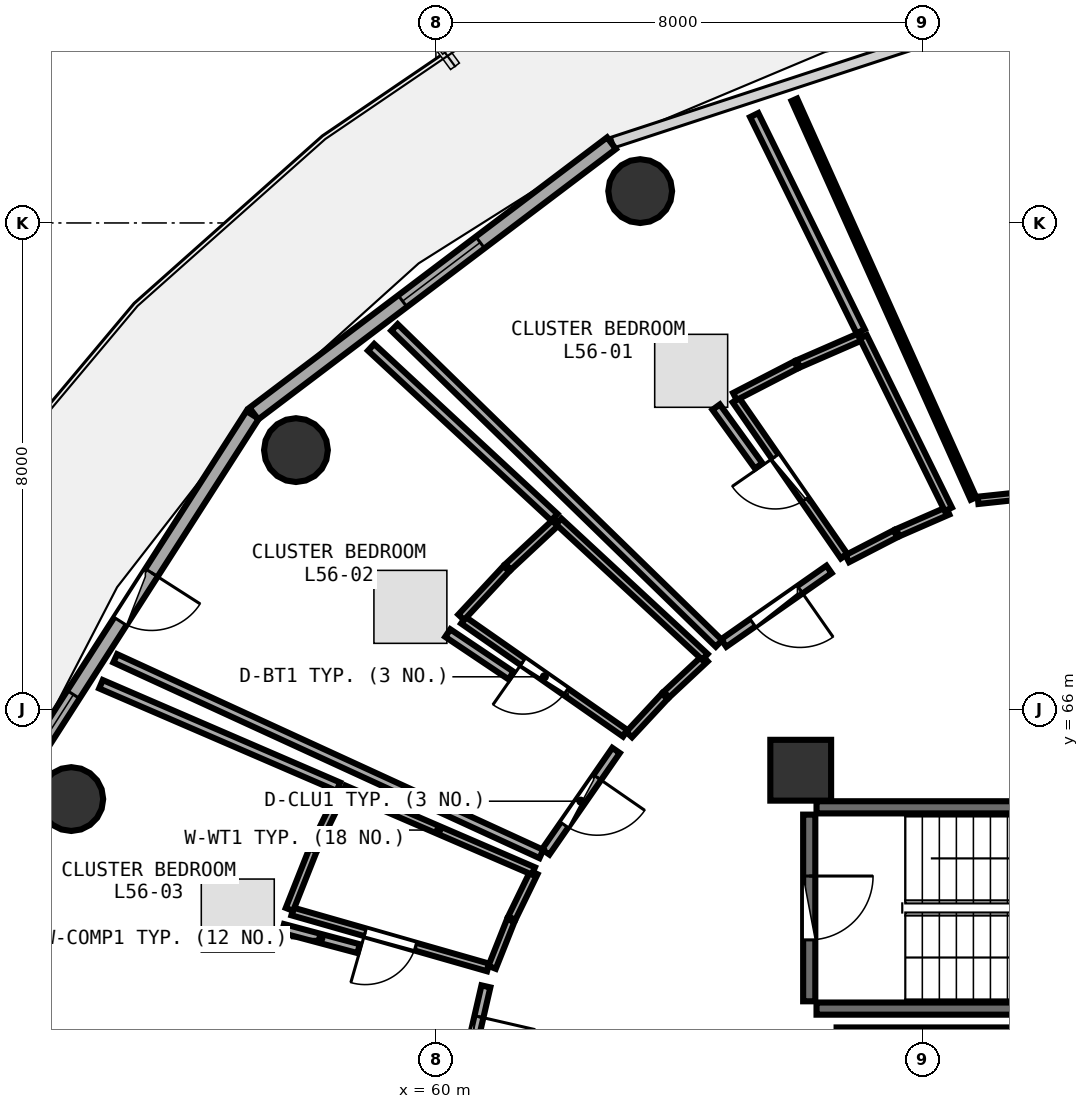
"""IFC4 building model, lengths in metres.
Left out: names, types, materials, properties, quantities, classifications, styles, units other than length and angle.
Written with IfcOpenShell. Run it as: python <this file> out.ifc"""

import sys

from ifc_helpers import new_model, si_unit, direction, frame, frame_2d, origin, origin_2d, place, context, subcontext, project, spatial, rectangle, circle, extrude, element, fill, save


model = new_model("IFC4")
c1 = context("Model", 3, precision=1e-05, world=origin(), true_north=direction((0.0, 1.0)))
c2 = subcontext(c1, "Body", "Model", "MODEL_VIEW")
j1 = project(units=[si_unit("LENGTHUNIT", "METRE"), si_unit("PLANEANGLEUNIT", "RADIAN")], contexts=[c1])
p1 = place(None, origin())
s1 = spatial("IfcSite", under=j1, at=p1, CompositionType="ELEMENT")
p2 = place(p1, origin())
s2 = spatial("IfcBuilding", under=s1, at=p2, CompositionType="ELEMENT")
p3 = place(p2, frame((0.0, 0.0, 219.45)))
s3 = spatial("IfcBuildingStorey", under=s2, at=p3, CompositionType="ELEMENT", Elevation=219.45)
p4 = place(p3, frame((66.0, 65.0, 0.0), z_axis=(0.0, 0.0, 1.0), x_axis=(1.0, 0.0, 0.0)))
e1 = element("IfcColumn", 1, at=p4, inside=s3, PredefinedType="PILASTER", context=c2, shape_type="SweptSolid", body=[
    extrude(rectangle(XDim=1.0, YDim=1.0, at=origin_2d()), origin(), (0.0, 0.0, 1.0), 3.75),
])
for number, where, z_axis, x_axis in (
    (2, (63.36, 74.524, 0.0), (0.0, 0.0, 1.0), (1.0, 0.0, 0.0)),
    (3, (57.698, 70.264, 0.0), (0.0, 0.0, 1.0), (1.0, 0.0, 0.0)),
    (4, (54.003, 64.526, 0.0), (0.0, 0.0, 1.0), (1.0, 0.0, 0.0)),
):
    element("IfcColumn", number, at=place(p3, frame(where, z_axis=z_axis, x_axis=x_axis)), inside=s3, PredefinedType="COLUMN", context=c2, shape_type="SweptSolid", body=[
        extrude(circle(Radius=0.525, at=origin_2d()), origin(), (0.0, 0.0, 1.0), 3.75),
    ])
p5 = place(p3, frame((62.888, 75.312, 0.0), z_axis=(0.0, 0.0, 1.0), x_axis=(-0.797701674595, -0.603052268338, 0.0)))
e5 = element("IfcWall", 5, at=p5, inside=s3, PredefinedType="SOLIDWALL", context=c2, shape_type="SweptSolid", body=[
    extrude(rectangle(XDim=7.374, YDim=0.24, at=frame_2d((3.687, 0.0))), origin(), (0.0, 0.0, 1.0), 3.475),
])
p6 = place(p5, frame((2.707, 0.0, 0.85)))
e6 = element("IfcOpeningElement", 6, at=p6, cuts=e5, PredefinedType="OPENING", context=c2, shape_type="SweptSolid", body=[
    extrude(rectangle(XDim=1.6, YDim=1.45, at=frame_2d((0.8, 0.725))), frame((0.0, 0.13, 0.0), z_axis=(0.0, -1.0, 0.0), x_axis=(1.0, 0.0, 0.0)), (0.0, 0.0, 1.0), 0.26),
])
p7 = place(p3, frame((56.986, 70.843, 0.0), z_axis=(0.0, 0.0, 1.0), x_axis=(-0.539539512973, -0.841960280501, 0.0)))
e7 = element("IfcWall", 7, at=p7, inside=s3, PredefinedType="SOLIDWALL", context=c2, shape_type="SweptSolid", body=[
    extrude(rectangle(XDim=7.115, YDim=0.24, at=frame_2d((3.557, 0.0))), origin(), (0.0, 0.0, 1.0), 3.475),
])
p8 = place(p7, frame((3.082, 0.0, 0.0)))
e8 = element("IfcOpeningElement", 8, at=p8, cuts=e7, PredefinedType="OPENING", context=c2, shape_type="SweptSolid", body=[
    extrude(rectangle(XDim=0.95, YDim=2.1, at=frame_2d((0.475, 1.05))), frame((0.0, 0.13, 0.0), z_axis=(0.0, -1.0, 0.0), x_axis=(1.0, 0.0, 0.0)), (0.0, 0.0, 1.0), 0.26),
])
p9 = place(p7, frame((5.462, 0.0, 0.85)))
e9 = element("IfcOpeningElement", 9, at=p9, cuts=e7, PredefinedType="OPENING", context=c2, shape_type="SweptSolid", body=[
    extrude(rectangle(XDim=1.2, YDim=1.45, at=frame_2d((0.6, 0.725))), frame((0.0, 0.13, 0.0), z_axis=(0.0, -1.0, 0.0), x_axis=(1.0, 0.0, 0.0)), (0.0, 0.0, 1.0), 0.26),
])
for number, where, z_axis, x_axis in (
    (10, (66.26, 61.08, 0.0), (0.0, 0.0, 1.0), (1.0, 0.0, 0.0)),
    (11, (73.42, 64.39, 0.0), (0.0, 0.0, 1.0), (-1.0, 0.0, 0.0)),
):
    element("IfcWall", number, at=place(p3, frame(where, z_axis=z_axis, x_axis=x_axis)), inside=s3, PredefinedType="SHEAR", context=c2, shape_type="SweptSolid", body=[
        extrude(rectangle(XDim=7.16, YDim=0.2, at=frame_2d((3.58, 0.0))), origin(), (0.0, 0.0, 1.0), 3.49),
    ])
p10 = place(p3, frame((66.14, 64.27, 0.0), z_axis=(0.0, 0.0, 1.0), x_axis=(0.0, -1.0, 0.0)))
e12 = element("IfcWall", 12, at=p10, inside=s3, PredefinedType="SHEAR", context=c2, shape_type="SweptSolid", body=[
    extrude(rectangle(XDim=3.07, YDim=0.2, at=frame_2d((1.535, 0.0))), origin(), (0.0, 0.0, 1.0), 3.49),
])
p11 = place(p10, frame((1.01, 0.0, 0.0)))
e13 = element("IfcOpeningElement", 13, at=p11, cuts=e12, PredefinedType="OPENING", context=c2, shape_type="SweptSolid", body=[
    extrude(rectangle(XDim=1.05, YDim=2.1, at=frame_2d((0.525, 1.05))), frame((0.0, 0.11, 0.0), z_axis=(0.0, -1.0, 0.0), x_axis=(1.0, 0.0, 0.0)), (0.0, 0.0, 1.0), 0.22),
])
p12 = place(p3, frame((75.969, 70.189, 0.0), z_axis=(0.0, 0.0, 1.0), x_axis=(-0.994385599796, -0.105817195755, 0.0)))
e14 = element("IfcWall", 14, at=p12, inside=s3, PredefinedType="PARTITIONING", context=c2, shape_type="SweptSolid", body=[
    extrude(rectangle(XDim=7.092, YDim=0.12, at=frame_2d((3.546, 0.0))), origin(), (0.0, 0.0, 1.0), 3.025),
])
p13 = place(p12, frame((3.096, 0.0, 0.0)))
e15 = element("IfcOpeningElement", 15, at=p13, cuts=e14, PredefinedType="OPENING", context=c2, shape_type="SweptSolid", body=[
    extrude(rectangle(XDim=0.9, YDim=2.08, at=frame_2d((0.45, 1.04))), frame((0.0, 0.07, 0.0), z_axis=(0.0, -1.0, 0.0), x_axis=(1.0, 0.0, 0.0)), (0.0, 0.0, 1.0), 0.14),
])
p14 = place(p3, frame((66.714, 68.519, 0.0), z_axis=(0.0, 0.0, 1.0), x_axis=(-0.569575575996, 0.821938965635, 0.0)))
e16 = element("IfcWall", 16, at=p14, inside=s3, PredefinedType="PLUMBINGWALL", context=c2, shape_type="SweptSolid", body=[
    extrude(rectangle(XDim=3.125, YDim=0.13, at=frame_2d((1.562, 0.0))), origin(), (0.0, 0.0, 1.0), 3.175),
])
p15 = place(p14, frame((1.132, 0.0, 0.0)))
e17 = element("IfcOpeningElement", 17, at=p15, cuts=e16, PredefinedType="OPENING", context=c2, shape_type="SweptSolid", body=[
    extrude(rectangle(XDim=0.86, YDim=2.05, at=frame_2d((0.43, 1.025))), frame((0.0, 0.075, 0.0), z_axis=(0.0, -1.0, 0.0), x_axis=(1.0, 0.0, 0.0)), (0.0, 0.0, 1.0), 0.15),
])
p16 = place(p3, frame((66.466, 68.302, 0.0), z_axis=(0.0, 0.0, 1.0), x_axis=(-0.819606107513, -0.572927419948, 0.0)))
e18 = element("IfcWall", 18, at=p16, inside=s3, PredefinedType="PARTITIONING", context=c2, shape_type="SweptSolid", body=[
    extrude(rectangle(XDim=2.114, YDim=0.15, at=frame_2d((1.057, 0.0))), origin(), (0.0, 0.0, 1.0), 3.025),
])
p17 = place(p16, frame((0.582, 0.0, 0.0)))
e19 = element("IfcOpeningElement", 19, at=p17, cuts=e18, PredefinedType="OPENING", context=c2, shape_type="SweptSolid", body=[
    extrude(rectangle(XDim=0.95, YDim=2.08, at=frame_2d((0.475, 1.04))), frame((0.0, 0.085, 0.0), z_axis=(0.0, -1.0, 0.0), x_axis=(1.0, 0.0, 0.0)), (0.0, 0.0, 1.0), 0.17),
])
p18 = place(p3, frame((63.115, 65.606, 0.0), z_axis=(0.0, 0.0, 1.0), x_axis=(-0.819768322712, 0.57269529165, 0.0)))
e20 = element("IfcWall", 20, at=p18, inside=s3, PredefinedType="PLUMBINGWALL", context=c2, shape_type="SweptSolid", body=[
    extrude(rectangle(XDim=3.248, YDim=0.13, at=frame_2d((1.624, 0.0))), origin(), (0.0, 0.0, 1.0), 3.175),
])
p19 = place(p18, frame((1.194, 0.0, 0.0)))
e21 = element("IfcOpeningElement", 21, at=p19, cuts=e20, PredefinedType="OPENING", context=c2, shape_type="SweptSolid", body=[
    extrude(rectangle(XDim=0.86, YDim=2.05, at=frame_2d((0.43, 1.025))), frame((0.0, 0.075, 0.0), z_axis=(0.0, -1.0, 0.0), x_axis=(1.0, 0.0, 0.0)), (0.0, 0.0, 1.0), 0.15),
])
p20 = place(p3, frame((62.963, 65.326, 0.0), z_axis=(0.0, 0.0, 1.0), x_axis=(-0.569634666298, -0.821898014933, 0.0)))
e22 = element("IfcWall", 22, at=p20, inside=s3, PredefinedType="PARTITIONING", context=c2, shape_type="SweptSolid", body=[
    extrude(rectangle(XDim=2.032, YDim=0.15, at=frame_2d((1.016, 0.0))), origin(), (0.0, 0.0, 1.0), 3.025),
])
p21 = place(p20, frame((0.541, 0.0, 0.0)))
e23 = element("IfcOpeningElement", 23, at=p21, cuts=e22, PredefinedType="OPENING", context=c2, shape_type="SweptSolid", body=[
    extrude(rectangle(XDim=0.95, YDim=2.08, at=frame_2d((0.475, 1.04))), frame((0.0, 0.085, 0.0), z_axis=(0.0, -1.0, 0.0), x_axis=(1.0, 0.0, 0.0)), (0.0, 0.0, 1.0), 0.17),
])
p22 = place(p3, frame((60.859, 61.757, 0.0), z_axis=(0.0, 0.0, 1.0), x_axis=(-0.961479890051, 0.274875282679, 0.0)))
e24 = element("IfcWall", 24, at=p22, inside=s3, PredefinedType="PLUMBINGWALL", context=c2, shape_type="SweptSolid", body=[
    extrude(rectangle(XDim=3.347, YDim=0.13, at=frame_2d((1.673, 0.0))), origin(), (0.0, 0.0, 1.0), 3.175),
])
p23 = place(p22, frame((1.243, 0.0, 0.0)))
e25 = element("IfcOpeningElement", 25, at=p23, cuts=e24, PredefinedType="OPENING", context=c2, shape_type="SweptSolid", body=[
    extrude(rectangle(XDim=0.86, YDim=2.05, at=frame_2d((0.43, 1.025))), frame((0.0, 0.075, 0.0), z_axis=(0.0, -1.0, 0.0), x_axis=(1.0, 0.0, 0.0)), (0.0, 0.0, 1.0), 0.15),
])
p24 = place(p3, frame((60.823, 61.446, 0.0), z_axis=(0.0, 0.0, 1.0), x_axis=(-0.223956243079, -0.97459920028, 0.0)))
e26 = element("IfcWall", 26, at=p24, inside=s3, PredefinedType="PARTITIONING", context=c2, shape_type="SweptSolid", body=[
    extrude(rectangle(XDim=1.974, YDim=0.15, at=frame_2d((0.987, 0.0))), origin(), (0.0, 0.0, 1.0), 3.48),
])
p25 = place(p24, frame((0.512, 0.0, 0.0)))
e27 = element("IfcOpeningElement", 27, at=p25, cuts=e26, PredefinedType="OPENING", context=c2, shape_type="SweptSolid", body=[
    extrude(rectangle(XDim=0.95, YDim=2.08, at=frame_2d((0.475, 1.04))), frame((0.0, 0.085, 0.0), z_axis=(0.0, -1.0, 0.0), x_axis=(1.0, 0.0, 0.0)), (0.0, 0.0, 1.0), 0.17),
])
p26 = place(p3, frame((72.41, 60.72, 0.0), z_axis=(0.0, 0.0, 1.0), x_axis=(-1.0, 0.0, 0.0)))
e28 = element("IfcWall", 28, at=p26, inside=s3, PredefinedType="PARTITIONING", context=c2, shape_type="SweptSolid", body=[
    extrude(rectangle(XDim=5.82, YDim=0.1, at=frame_2d((2.91, 0.0))), origin(), (0.0, 0.0, 1.0), 3.48),
])
p27 = place(p3, frame((68.841, 69.469, 0.0), z_axis=(0.0, 0.0, 1.0), x_axis=(-0.409724811959, 0.912209174732, 0.0)))
e29 = element("IfcWall", 29, at=p27, inside=s3, PredefinedType="PARTITIONING", context=c2, shape_type="SweptSolid", body=[
    extrude(rectangle(XDim=7.188, YDim=0.1, at=frame_2d((3.594, 0.0))), origin(), (0.0, 0.0, 1.0), 3.075),
])
p28 = place(p3, frame((68.419, 69.265, 0.0), z_axis=(0.0, 0.0, 1.0), x_axis=(-0.916724041683, -0.399521002453, 0.0)))
e30 = element("IfcWall", 30, at=p28, inside=s3, PredefinedType="PLUMBINGWALL", context=c2, shape_type="SweptSolid", body=[
    extrude(rectangle(XDim=0.898, YDim=0.13, at=frame_2d((0.449, 0.0))), origin(), (0.0, 0.0, 1.0), 3.235),
])
p29 = place(p3, frame((67.559, 68.889, 0.0), z_axis=(0.0, 0.0, 1.0), x_axis=(-0.888498384955, -0.458879744523, 0.0)))
e31 = element("IfcWall", 31, at=p29, inside=s3, PredefinedType="PLUMBINGWALL", context=c2, shape_type="SweptSolid", body=[
    extrude(rectangle(XDim=0.893, YDim=0.13, at=frame_2d((0.446, 0.0))), origin(), (0.0, 0.0, 1.0), 3.235),
])
p30 = place(p3, frame((64.918, 71.146, 0.0), z_axis=(0.0, 0.0, 1.0), x_axis=(0.88839364622, 0.459082486439, 0.0)))
e32 = element("IfcWall", 32, at=p30, inside=s3, PredefinedType="PLUMBINGWALL", context=c2, shape_type="SweptSolid", body=[
    extrude(rectangle(XDim=1.132, YDim=0.13, at=frame_2d((0.566, 0.0))), origin(), (0.0, 0.0, 1.0), 3.48),
])
p31 = place(p3, frame((65.959, 71.683, 0.0), z_axis=(0.0, 0.0, 1.0), x_axis=(0.916875363269, 0.399173606631, 0.0)))
e33 = element("IfcWall", 33, at=p31, inside=s3, PredefinedType="PLUMBINGWALL", context=c2, shape_type="SweptSolid", body=[
    extrude(rectangle(XDim=1.137, YDim=0.13, at=frame_2d((0.568, 0.0))), origin(), (0.0, 0.0, 1.0), 3.48),
])
p32 = place(p3, frame((67.029, 72.127, 0.0), z_axis=(0.0, 0.0, 1.0), x_axis=(0.442483009424, -0.896776887732, 0.0)))
e34 = element("IfcWall", 34, at=p32, inside=s3, PredefinedType="PLUMBINGWALL", context=c2, shape_type="SweptSolid", body=[
    extrude(rectangle(XDim=3.163, YDim=0.13, at=frame_2d((1.581, 0.0))), origin(), (0.0, 0.0, 1.0), 3.175),
])
p33 = place(p3, frame((64.655, 67.085, 0.0), z_axis=(0.0, 0.0, 1.0), x_axis=(-0.716418161924, 0.697671138335, 0.0)))
e35 = element("IfcWall", 35, at=p33, inside=s3, PredefinedType="PARTITIONING", context=c2, shape_type="SweptSolid", body=[
    extrude(rectangle(XDim=7.449, YDim=0.15, at=frame_2d((3.725, 0.0))), origin(), (0.0, 0.0, 1.0), 3.075),
])
p34 = place(p3, frame((65.235, 75.774, 0.0), z_axis=(0.0, 0.0, 1.0), x_axis=(0.441884590329, -0.897071908394, 0.0)))
e36 = element("IfcWall", 36, at=p34, inside=s3, PredefinedType="PARTITIONING", context=c2, shape_type="SweptSolid", body=[
    extrude(rectangle(XDim=3.964, YDim=0.15, at=frame_2d((1.982, 0.0))), origin(), (0.0, 0.0, 1.0), 3.075),
])
p35 = place(p3, frame((64.609, 70.972, 0.0), z_axis=(0.0, 0.0, 1.0), x_axis=(0.586088334164, -0.810247162634, 0.0)))
e37 = element("IfcWall", 37, at=p35, inside=s3, PredefinedType="PARTITIONING", context=c2, shape_type="SweptSolid", body=[
    extrude(rectangle(XDim=1.193, YDim=0.15, at=frame_2d((0.596, 0.0))), origin(), (0.0, 0.0, 1.0), 3.175),
])
p36 = place(p3, frame((64.425, 66.836, 0.0), z_axis=(0.0, 0.0, 1.0), x_axis=(-0.73090544696, -0.68247873784, 0.0)))
e38 = element("IfcWall", 38, at=p36, inside=s3, PredefinedType="PLUMBINGWALL", context=c2, shape_type="SweptSolid", body=[
    extrude(rectangle(XDim=0.867, YDim=0.13, at=frame_2d((0.434, 0.0))), origin(), (0.0, 0.0, 1.0), 3.025),
])
p37 = place(p3, frame((63.763, 66.216, 0.0), z_axis=(0.0, 0.0, 1.0), x_axis=(-0.681245485542, -0.732055044672, 0.0)))
e39 = element("IfcWall", 39, at=p37, inside=s3, PredefinedType="PLUMBINGWALL", context=c2, shape_type="SweptSolid", body=[
    extrude(rectangle(XDim=0.86, YDim=0.13, at=frame_2d((0.43, 0.0))), origin(), (0.0, 0.0, 1.0), 3.025),
])
p38 = place(p3, frame((60.417, 67.516, 0.0), z_axis=(0.0, 0.0, 1.0), x_axis=(0.68101744228, 0.732267193933, 0.0)))
e40 = element("IfcWall", 40, at=p38, inside=s3, PredefinedType="PLUMBINGWALL", context=c2, shape_type="SweptSolid", body=[
    extrude(rectangle(XDim=1.091, YDim=0.13, at=frame_2d((0.545, 0.0))), origin(), (0.0, 0.0, 1.0), 3.025),
])
p39 = place(p3, frame((61.188, 68.343, 0.0), z_axis=(0.0, 0.0, 1.0), x_axis=(0.731358373013, 0.681993350572, 0.0)))
e41 = element("IfcWall", 41, at=p39, inside=s3, PredefinedType="PLUMBINGWALL", context=c2, shape_type="SweptSolid", body=[
    extrude(rectangle(XDim=1.098, YDim=0.13, at=frame_2d((0.549, 0.0))), origin(), (0.0, 0.0, 1.0), 3.175),
])
p40 = place(p3, frame((62.02, 69.091, 0.0), z_axis=(0.0, 0.0, 1.0), x_axis=(0.733691925976, -0.679482271849, 0.0)))
e42 = element("IfcWall", 42, at=p40, inside=s3, PredefinedType="PLUMBINGWALL", context=c2, shape_type="SweptSolid", body=[
    extrude(rectangle(XDim=3.279, YDim=0.13, at=frame_2d((1.639, 0.0))), origin(), (0.0, 0.0, 1.0), 3.175),
])
p41 = place(p3, frame((61.735, 63.623, 0.0), z_axis=(0.0, 0.0, 1.0), x_axis=(-0.908799831152, 0.417232389561, 0.0)))
e43 = element("IfcWall", 43, at=p41, inside=s3, PredefinedType="PARTITIONING", context=c2, shape_type="SweptSolid", body=[
    extrude(rectangle(XDim=7.712, YDim=0.15, at=frame_2d((3.856, 0.0))), origin(), (0.0, 0.0, 1.0), 3.025),
])
p42 = place(p3, frame((58.934, 71.955, 0.0), z_axis=(0.0, 0.0, 1.0), x_axis=(0.733337091809, -0.679865214419, 0.0)))
e44 = element("IfcWall", 44, at=p42, inside=s3, PredefinedType="PARTITIONING", context=c2, shape_type="SweptSolid", body=[
    extrude(rectangle(XDim=4.109, YDim=0.15, at=frame_2d((2.055, 0.0))), origin(), (0.0, 0.0, 1.0), 3.075),
])
p43 = place(p3, frame((60.195, 67.256, 0.0), z_axis=(0.0, 0.0, 1.0), x_axis=(0.830279043522, -0.557347925347, 0.0)))
e45 = element("IfcWall", 45, at=p43, inside=s3, PredefinedType="PARTITIONING", context=c2, shape_type="SweptSolid", body=[
    extrude(rectangle(XDim=1.254, YDim=0.15, at=frame_2d((0.627, 0.0))), origin(), (0.0, 0.0, 1.0), 3.175),
])
p44 = place(p3, frame((61.613, 63.318, 0.0), z_axis=(0.0, 0.0, 1.0), x_axis=(-0.437484879269, -0.899225767208, 0.0)))
e46 = element("IfcWall", 46, at=p44, inside=s3, PredefinedType="PLUMBINGWALL", context=c2, shape_type="SweptSolid", body=[
    extrude(rectangle(XDim=0.835, YDim=0.13, at=frame_2d((0.418, 0.0))), origin(), (0.0, 0.0, 1.0), 3.235),
])
p45 = place(p3, frame((61.232, 62.531, 0.0), z_axis=(0.0, 0.0, 1.0), x_axis=(-0.369921104598, -0.929063171358, 0.0)))
e47 = element("IfcWall", 47, at=p45, inside=s3, PredefinedType="PLUMBINGWALL", context=c2, shape_type="SweptSolid", body=[
    extrude(rectangle(XDim=0.831, YDim=0.13, at=frame_2d((0.416, 0.0))), origin(), (0.0, 0.0, 1.0), 3.235),
])
p46 = place(p3, frame((57.591, 62.712, 0.0), z_axis=(0.0, 0.0, 1.0), x_axis=(0.368988727478, 0.929433870157, 0.0)))
e48 = element("IfcWall", 48, at=p46, inside=s3, PredefinedType="PLUMBINGWALL", context=c2, shape_type="SweptSolid", body=[
    extrude(rectangle(XDim=1.052, YDim=0.13, at=frame_2d((0.526, 0.0))), origin(), (0.0, 0.0, 1.0), 3.48),
])
p47 = place(p3, frame((57.996, 63.726, 0.0), z_axis=(0.0, 0.0, 1.0), x_axis=(0.438432715101, 0.898764014816, 0.0)))
e49 = element("IfcWall", 49, at=p47, inside=s3, PredefinedType="PLUMBINGWALL", context=c2, shape_type="SweptSolid", body=[
    extrude(rectangle(XDim=1.059, YDim=0.13, at=frame_2d((0.53, 0.0))), origin(), (0.0, 0.0, 1.0), 3.025),
])
p48 = place(p3, frame((58.487, 64.688, 0.0), z_axis=(0.0, 0.0, 1.0), x_axis=(0.918238400885, -0.396028078727, 0.0)))
e50 = element("IfcWall", 50, at=p48, inside=s3, PredefinedType="PLUMBINGWALL", context=c2, shape_type="SweptSolid", body=[
    extrude(rectangle(XDim=3.394, YDim=0.13, at=frame_2d((1.697, 0.0))), origin(), (0.0, 0.0, 1.0), 3.025),
])
p49 = place(p3, frame((54.492, 66.414, 0.0), z_axis=(0.0, 0.0, 1.0), x_axis=(0.918147334224, -0.396239160934, 0.0)))
e51 = element("IfcWall", 51, at=p49, inside=s3, PredefinedType="PARTITIONING", context=c2, shape_type="SweptSolid", body=[
    extrude(rectangle(XDim=4.253, YDim=0.15, at=frame_2d((2.126, 0.0))), origin(), (0.0, 0.0, 1.0), 3.025),
])
p50 = place(p3, frame((57.483, 62.398, 0.0), z_axis=(0.0, 0.0, 1.0), x_axis=(0.966263202112, -0.257556642788, 0.0)))
e52 = element("IfcWall", 52, at=p50, inside=s3, PredefinedType="PARTITIONING", context=c2, shape_type="SweptSolid", body=[
    extrude(rectangle(XDim=1.29, YDim=0.15, at=frame_2d((0.645, 0.0))), origin(), (0.0, 0.0, 1.0), 3.175),
])
p51 = place(p6, origin())
e53 = element("IfcWindow", 53, at=p51, inside=s3, PartitioningType="SINGLE_PANEL", PredefinedType="WINDOW", context=c2, shape_type="SweptSolid", body=[
    extrude(rectangle(XDim=1.6, YDim=1.45, at=frame_2d((0.8, 0.725))), frame((0.0, 0.03, 0.0), z_axis=(0.0, -1.0, 0.0), x_axis=(1.0, 0.0, 0.0)), (0.0, 0.0, 1.0), 0.06),
])
fill(e6, e53)
p52 = place(p8, frame((0.95, 0.0, 0.0), z_axis=(0.0, 0.0, 1.0), x_axis=(-1.0, 0.0, 0.0)))
e54 = element("IfcDoor", 54, at=p52, inside=s3, OperationType="SINGLE_SWING_RIGHT", PredefinedType="DOOR", context=c2, shape_type="SweptSolid", body=[
    extrude(rectangle(XDim=0.95, YDim=2.1, at=frame_2d((0.475, 1.05))), frame((0.0, 0.025, 0.0), z_axis=(0.0, -1.0, 0.0), x_axis=(1.0, 0.0, 0.0)), (0.0, 0.0, 1.0), 0.05),
])
fill(e8, e54)
p53 = place(p9, origin())
e55 = element("IfcWindow", 55, at=p53, inside=s3, PartitioningType="SINGLE_PANEL", PredefinedType="WINDOW", context=c2, shape_type="SweptSolid", body=[
    extrude(rectangle(XDim=1.2, YDim=1.45, at=frame_2d((0.6, 0.725))), frame((0.0, 0.03, 0.0), z_axis=(0.0, -1.0, 0.0), x_axis=(1.0, 0.0, 0.0)), (0.0, 0.0, 1.0), 0.06),
])
fill(e9, e55)
p54 = place(p11, origin())
e56 = element("IfcDoor", 56, at=p54, inside=s3, OperationType="SINGLE_SWING_LEFT", PredefinedType="DOOR", context=c2, shape_type="SweptSolid", body=[
    extrude(rectangle(XDim=1.05, YDim=2.1, at=frame_2d((0.525, 1.05))), frame((0.0, 0.025, 0.0), z_axis=(0.0, -1.0, 0.0), x_axis=(1.0, 0.0, 0.0)), (0.0, 0.0, 1.0), 0.05),
])
fill(e13, e56)
p55 = place(p15, origin())
e57 = element("IfcDoor", 57, at=p55, inside=s3, OperationType="SINGLE_SWING_RIGHT", PredefinedType="DOOR", context=c2, shape_type="SweptSolid", body=[
    extrude(rectangle(XDim=0.86, YDim=2.05, at=frame_2d((0.43, 1.025))), frame((0.0, 0.025, 0.0), z_axis=(0.0, -1.0, 0.0), x_axis=(1.0, 0.0, 0.0)), (0.0, 0.0, 1.0), 0.05),
])
fill(e17, e57)
p56 = place(p17, origin())
e58 = element("IfcDoor", 58, at=p56, inside=s3, OperationType="SINGLE_SWING_LEFT", PredefinedType="DOOR", context=c2, shape_type="SweptSolid", body=[
    extrude(rectangle(XDim=0.95, YDim=2.08, at=frame_2d((0.475, 1.04))), frame((0.0, 0.025, 0.0), z_axis=(0.0, -1.0, 0.0), x_axis=(1.0, 0.0, 0.0)), (0.0, 0.0, 1.0), 0.05),
])
fill(e19, e58)
p57 = place(p19, origin())
e59 = element("IfcDoor", 59, at=p57, inside=s3, OperationType="SINGLE_SWING_RIGHT", PredefinedType="DOOR", context=c2, shape_type="SweptSolid", body=[
    extrude(rectangle(XDim=0.86, YDim=2.05, at=frame_2d((0.43, 1.025))), frame((0.0, 0.025, 0.0), z_axis=(0.0, -1.0, 0.0), x_axis=(1.0, 0.0, 0.0)), (0.0, 0.0, 1.0), 0.05),
])
fill(e21, e59)
p58 = place(p21, origin())
e60 = element("IfcDoor", 60, at=p58, inside=s3, OperationType="SINGLE_SWING_LEFT", PredefinedType="DOOR", context=c2, shape_type="SweptSolid", body=[
    extrude(rectangle(XDim=0.95, YDim=2.08, at=frame_2d((0.475, 1.04))), frame((0.0, 0.025, 0.0), z_axis=(0.0, -1.0, 0.0), x_axis=(1.0, 0.0, 0.0)), (0.0, 0.0, 1.0), 0.05),
])
fill(e23, e60)
p59 = place(p23, origin())
e61 = element("IfcDoor", 61, at=p59, inside=s3, OperationType="SINGLE_SWING_RIGHT", PredefinedType="DOOR", context=c2, shape_type="SweptSolid", body=[
    extrude(rectangle(XDim=0.86, YDim=2.05, at=frame_2d((0.43, 1.025))), frame((0.0, 0.025, 0.0), z_axis=(0.0, -1.0, 0.0), x_axis=(1.0, 0.0, 0.0)), (0.0, 0.0, 1.0), 0.05),
])
fill(e25, e61)
p60 = place(p25, origin())
e62 = element("IfcDoor", 62, at=p60, inside=s3, OperationType="SINGLE_SWING_LEFT", PredefinedType="DOOR", context=c2, shape_type="SweptSolid", body=[
    extrude(rectangle(XDim=0.95, YDim=2.08, at=frame_2d((0.475, 1.04))), frame((0.0, 0.025, 0.0), z_axis=(0.0, -1.0, 0.0), x_axis=(1.0, 0.0, 0.0)), (0.0, 0.0, 1.0), 0.05),
])
fill(e27, e62)
save(model, sys.argv[1])
